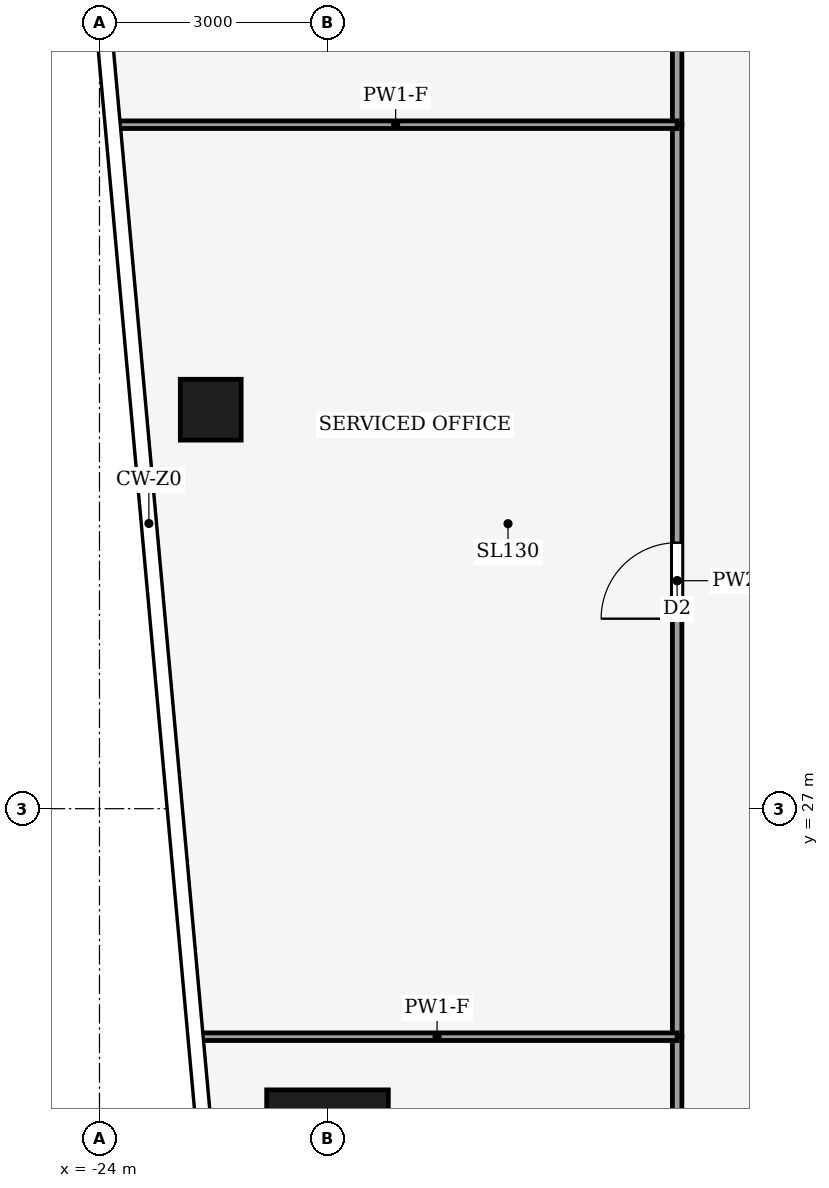
"""IFC4 building model, lengths in metres.
Left out: names, types, materials, properties, quantities, classifications, styles, units other than length and angle.
Written with IfcOpenShell. Run it as: python <this file> out.ifc"""

import sys

from ifc_helpers import new_model, si_unit, direction, frame, frame_2d, origin, origin_2d, place, context, subcontext, project, spatial, rectangle, hollow_rectangle, extrude, element, fill, save


model = new_model("IFC4")
c1 = context("Model", 3, precision=1e-05, world=origin(), true_north=direction((0.0, 1.0)))
c2 = subcontext(c1, "Body", "Model", "MODEL_VIEW")
j1 = project(units=[si_unit("LENGTHUNIT", "METRE"), si_unit("PLANEANGLEUNIT", "RADIAN")], contexts=[c1])
p1 = place(None, origin())
s1 = spatial("IfcSite", under=j1, at=p1, CompositionType="ELEMENT")
p2 = place(p1, origin())
s2 = spatial("IfcBuilding", under=s1, at=p2, CompositionType="ELEMENT")
p3 = place(p2, frame((0.0, 0.0, 30.0)))
s3 = spatial("IfcBuildingStorey", under=s2, at=p3, CompositionType="ELEMENT", Elevation=30.0)
p4 = place(p3, frame((-21.0, 22.5, 0.0), z_axis=(0.0, 0.0, 1.0), x_axis=(1.0, 0.0, 0.0)))
e1 = element("IfcColumn", 1, at=p4, inside=s3, PredefinedType="COLUMN", context=c2, shape_type="SweptSolid", body=[
    extrude(hollow_rectangle(XDim=1.6, YDim=1.6, WallThickness=0.09, at=origin_2d()), origin(), (0.0, 0.0, 1.0), 4.0),
])
p5 = place(p3, frame((-22.536, 32.25, 0.0), z_axis=(0.0, 0.0, 1.0), x_axis=(1.0, 0.0, 0.0)))
e2 = element("IfcColumn", 2, at=p5, inside=s3, PredefinedType="COLUMN", context=c2, shape_type="SweptSolid", body=[
    extrude(hollow_rectangle(XDim=0.8, YDim=0.8, WallThickness=0.04, at=origin_2d()), origin(), (0.0, 0.0, 1.0), 4.0),
])
p6 = place(p3, frame((-16.4, 14.596, 0.0), z_axis=(0.0, 0.0, 1.0), x_axis=(0.0, 1.0, 0.0)))
e3 = element("IfcWall", 3, at=p6, inside=s3, PredefinedType="PARTITIONING", context=c2, shape_type="SweptSolid", body=[
    extrude(rectangle(XDim=9.404, YDim=0.125, at=frame_2d((4.702, 0.0))), origin(), (0.0, 0.0, 1.0), 3.14),
])
p7 = place(p6, frame((4.202, 0.0, 0.0)))
e4 = element("IfcOpeningElement", 4, at=p7, cuts=e3, PredefinedType="OPENING", context=c2, shape_type="SweptSolid", body=[
    extrude(rectangle(XDim=1.0, YDim=2.1, at=frame_2d((0.5, 1.05))), frame((0.0, 0.073, 0.0), z_axis=(0.0, -1.0, 0.0), x_axis=(1.0, 0.0, 0.0)), (0.0, 0.0, 1.0), 0.145),
])
p8 = place(p3, frame((-16.4, 24.0, 0.0), z_axis=(0.0, 0.0, 1.0), x_axis=(0.0, 1.0, 0.0)))
e5 = element("IfcWall", 5, at=p8, inside=s3, PredefinedType="PARTITIONING", context=c2, shape_type="SweptSolid", body=[
    extrude(rectangle(XDim=12.0, YDim=0.125, at=frame_2d((6.0, 0.0))), origin(), (0.0, 0.0, 1.0), 3.48),
])
p9 = place(p8, frame((5.5, 0.0, 0.0)))
e6 = element("IfcOpeningElement", 6, at=p9, cuts=e5, PredefinedType="OPENING", context=c2, shape_type="SweptSolid", body=[
    extrude(rectangle(XDim=1.0, YDim=2.1, at=frame_2d((0.5, 1.05))), frame((0.0, 0.073, 0.0), z_axis=(0.0, -1.0, 0.0), x_axis=(1.0, 0.0, 0.0)), (0.0, 0.0, 1.0), 0.145),
])
p10 = place(p3, frame((-16.4, 36.0, 0.0), z_axis=(0.0, 0.0, 1.0), x_axis=(0.0, 1.0, 0.0)))
e7 = element("IfcWall", 7, at=p10, inside=s3, PredefinedType="PARTITIONING", context=c2, shape_type="SweptSolid", body=[
    extrude(rectangle(XDim=5.404, YDim=0.125, at=frame_2d((2.702, 0.0))), origin(), (0.0, 0.0, 1.0), 3.14),
])
p11 = place(p10, frame((2.202, 0.0, 0.0)))
e8 = element("IfcOpeningElement", 8, at=p11, cuts=e7, PredefinedType="OPENING", context=c2, shape_type="SweptSolid", body=[
    extrude(rectangle(XDim=1.0, YDim=2.1, at=frame_2d((0.5, 1.05))), frame((0.0, 0.073, 0.0), z_axis=(0.0, -1.0, 0.0), x_axis=(1.0, 0.0, 0.0)), (0.0, 0.0, 1.0), 0.145),
])
p12 = place(p3, frame((-16.4, 24.0, 0.0), z_axis=(0.0, 0.0, 1.0), x_axis=(-1.0, 0.0, 0.0)))
e9 = element("IfcWall", 9, at=p12, inside=s3, PredefinedType="PARTITIONING", context=c2, shape_type="SweptSolid", body=[
    extrude(rectangle(XDim=6.316, YDim=0.1, at=frame_2d((3.158, 0.0))), origin(), (0.0, 0.0, 1.0), 3.04),
])
p13 = place(p3, frame((-16.4, 36.0, 0.0), z_axis=(0.0, 0.0, 1.0), x_axis=(-1.0, 0.0, 0.0)))
e10 = element("IfcWall", 10, at=p13, inside=s3, PredefinedType="PARTITIONING", context=c2, shape_type="SweptSolid", body=[
    extrude(rectangle(XDim=7.407, YDim=0.1, at=frame_2d((3.704, 0.0))), origin(), (0.0, 0.0, 1.0), 3.04),
])
p14 = place(p9, origin())
e11 = element("IfcDoor", 11, at=p14, inside=s3, OperationType="SINGLE_SWING_LEFT", PredefinedType="DOOR", context=c2, shape_type="SweptSolid", body=[
    extrude(rectangle(XDim=1.0, YDim=2.1, at=frame_2d((0.5, 1.05))), frame((0.0, 0.025, 0.0), z_axis=(0.0, -1.0, 0.0), x_axis=(1.0, 0.0, 0.0)), (0.0, 0.0, 1.0), 0.05),
])
fill(e6, e11)
save(model, sys.argv[1])
